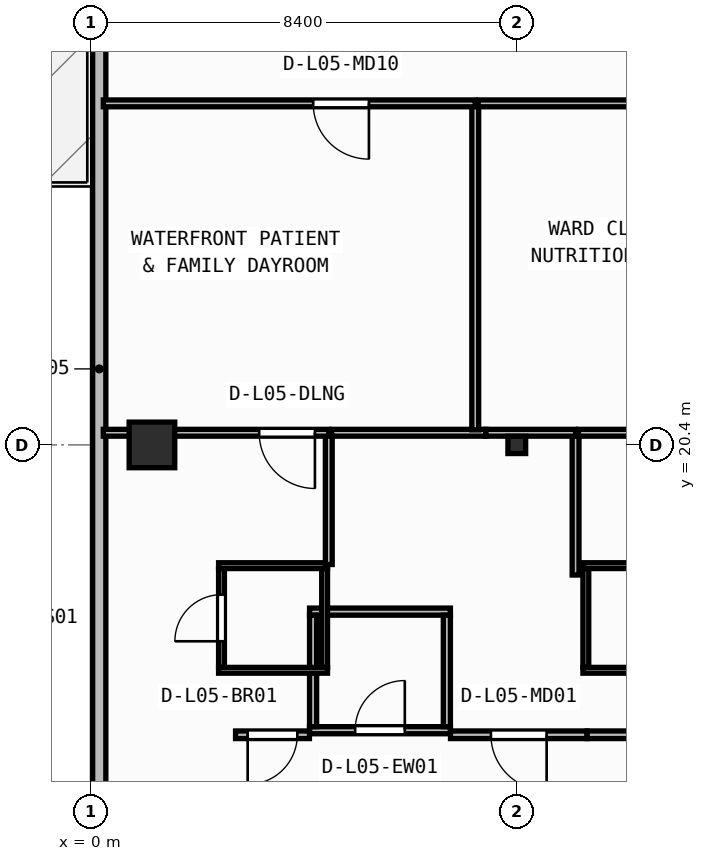
"""IFC4 building model, lengths in metres.
Left out: names, types, materials, properties, quantities, classifications, styles, units other than length and angle.
Written with IfcOpenShell. Run it as: python <this file> out.ifc"""

import sys

from ifc_helpers import new_model, si_unit, direction, frame, frame_2d, origin, origin_2d, place, context, subcontext, project, spatial, rectangle, i_section, extrude, element, fill, save


model = new_model("IFC4")
c1 = context("Model", 3, precision=1e-05, world=origin(), true_north=direction((0.0, 1.0)))
c2 = subcontext(c1, "Body", "Model", "MODEL_VIEW")
j1 = project(units=[si_unit("LENGTHUNIT", "METRE"), si_unit("PLANEANGLEUNIT", "RADIAN")], contexts=[c1])
p1 = place(None, origin())
s1 = spatial("IfcSite", under=j1, at=p1, CompositionType="ELEMENT")
p2 = place(p1, origin())
s2 = spatial("IfcBuilding", under=s1, at=p2, CompositionType="ELEMENT")
p3 = place(p2, frame((0.0, 0.0, 22.5)))
s3 = spatial("IfcBuildingStorey", under=s2, at=p3, CompositionType="ELEMENT", Elevation=22.5)
p4 = place(p3, frame((1.2, 20.4, 0.0), z_axis=(0.0, 0.0, 1.0), x_axis=(1.0, 0.0, 0.0)))
e1 = element("IfcColumn", 1, at=p4, inside=s3, PredefinedType="COLUMN", context=c2, shape_type="SweptSolid", body=[
    extrude(rectangle(XDim=0.9, YDim=0.9, at=origin_2d()), origin(), (0.0, 0.0, 1.0), 3.95),
])
p5 = place(p3, frame((8.4, 20.4, 0.0), z_axis=(0.0, 0.0, 1.0), x_axis=(1.0, 0.0, 0.0)))
e2 = element("IfcColumn", 2, at=p5, inside=s3, PredefinedType="COLUMN", context=c2, shape_type="SweptSolid", body=[
    extrude(i_section(OverallWidth=0.35, OverallDepth=0.34, WebThickness=0.016, FlangeThickness=0.028, at=origin_2d()), origin(), (0.0, 0.0, 1.0), 3.95),
])
p6 = place(p3, frame((0.16, 41.04, 0.0), z_axis=(0.0, 0.0, 1.0), x_axis=(0.0, -1.0, 0.0)))
e3 = element("IfcWall", 3, at=p6, inside=s3, PredefinedType="STANDARD", context=c2, shape_type="SweptSolid", body=[
    extrude(rectangle(XDim=38.28, YDim=0.26, at=frame_2d((19.14, 0.0))), origin(), (0.0, 0.0, 1.0), 3.71),
])
p7 = place(p6, frame((6.793, 0.0, 0.0)))
e4 = element("IfcOpeningElement", 4, at=p7, cuts=e3, PredefinedType="OPENING", context=c2, shape_type="SweptSolid", body=[
    extrude(rectangle(XDim=1.3, YDim=2.15, at=frame_2d((0.65, 1.075))), frame((0.0, 0.14, 0.0), z_axis=(0.0, -1.0, 0.0), x_axis=(1.0, 0.0, 0.0)), (0.0, 0.0, 1.0), 0.28),
])
p8 = place(p3, frame((4.31, 14.77, 0.0), z_axis=(0.0, 0.0, 1.0), x_axis=(1.0, 0.0, 0.0)))
e5 = element("IfcWall", 5, at=p8, inside=s3, PredefinedType="PARTITIONING", context=c2, shape_type="SweptSolid", body=[
    extrude(rectangle(XDim=2.78, YDim=0.14, at=frame_2d((1.39, 0.0))), origin(), (0.0, 0.0, 1.0), 3.71),
])
p9 = place(p8, frame((0.9, 0.0, 0.0)))
e6 = element("IfcOpeningElement", 6, at=p9, cuts=e5, PredefinedType="OPENING", context=c2, shape_type="SweptSolid", body=[
    extrude(rectangle(XDim=0.98, YDim=2.1, at=frame_2d((0.49, 1.05))), frame((0.0, 0.08, 0.0), z_axis=(0.0, -1.0, 0.0), x_axis=(1.0, 0.0, 0.0)), (0.0, 0.0, 1.0), 0.16),
])
p10 = place(p3, frame((4.31, 17.11, 0.0), z_axis=(0.0, 0.0, 1.0), x_axis=(1.0, 0.0, 0.0)))
e7 = element("IfcWall", 7, at=p10, inside=s3, PredefinedType="PARTITIONING", context=c2, shape_type="SweptSolid", body=[
    extrude(rectangle(XDim=2.78, YDim=0.14, at=frame_2d((1.39, 0.0))), origin(), (0.0, 0.0, 1.0), 3.71),
])
for number, where, z_axis, x_axis in (
    (8, (4.38, 14.84, 0.0), (0.0, 0.0, 1.0), (0.0, 1.0, 0.0)),
    (9, (7.02, 14.84, 0.0), (0.0, 0.0, 1.0), (0.0, 1.0, 0.0)),
):
    element("IfcWall", number, at=place(p3, frame(where, z_axis=z_axis, x_axis=x_axis)), inside=s3, PredefinedType="PARTITIONING", context=c2, shape_type="SweptSolid", body=[
        extrude(rectangle(XDim=2.2, YDim=0.14, at=frame_2d((1.1, 0.0))), origin(), (0.0, 0.0, 1.0), 3.71),
    ])
for number, where, z_axis, x_axis in (
    (10, (2.515, 15.952, 0.0), (0.0, 0.0, 1.0), (1.0, 0.0, 0.0)),
    (11, (2.515, 18.018, 0.0), (0.0, 0.0, 1.0), (1.0, 0.0, 0.0)),
):
    element("IfcWall", number, at=place(p3, frame(where, z_axis=z_axis, x_axis=x_axis)), inside=s3, PredefinedType="PARTITIONING", context=c2, shape_type="SweptSolid", body=[
        extrude(rectangle(XDim=2.15, YDim=0.115, at=frame_2d((1.075, 0.0))), origin(), (0.0, 0.0, 1.0), 3.71),
    ])
p11 = place(p3, frame((2.573, 16.01, 0.0), z_axis=(0.0, 0.0, 1.0), x_axis=(0.0, 1.0, 0.0)))
e12 = element("IfcWall", 12, at=p11, inside=s3, PredefinedType="PARTITIONING", context=c2, shape_type="SweptSolid", body=[
    extrude(rectangle(XDim=1.95, YDim=0.115, at=frame_2d((0.975, 0.0))), origin(), (0.0, 0.0, 1.0), 3.71),
])
p12 = place(p11, frame((0.515, 0.0, 0.0)))
e13 = element("IfcOpeningElement", 13, at=p12, cuts=e12, PredefinedType="OPENING", context=c2, shape_type="SweptSolid", body=[
    extrude(rectangle(XDim=0.92, YDim=2.1, at=frame_2d((0.46, 1.05))), frame((0.0, 0.067, 0.0), z_axis=(0.0, -1.0, 0.0), x_axis=(1.0, 0.0, 0.0)), (0.0, 0.0, 1.0), 0.135),
])
p13 = place(p3, frame((4.607, 16.01, 0.0), z_axis=(0.0, 0.0, 1.0), x_axis=(0.0, 1.0, 0.0)))
e14 = element("IfcWall", 14, at=p13, inside=s3, PredefinedType="PARTITIONING", context=c2, shape_type="SweptSolid", body=[
    extrude(rectangle(XDim=1.95, YDim=0.115, at=frame_2d((0.975, 0.0))), origin(), (0.0, 0.0, 1.0), 3.71),
])
for number, where, z_axis, x_axis in (
    (15, (9.705, 15.952, 0.0), (0.0, 0.0, 1.0), (1.0, 0.0, 0.0)),
    (16, (9.705, 18.018, 0.0), (0.0, 0.0, 1.0), (1.0, 0.0, 0.0)),
):
    element("IfcWall", number, at=place(p3, frame(where, z_axis=z_axis, x_axis=x_axis)), inside=s3, PredefinedType="PARTITIONING", context=c2, shape_type="SweptSolid", body=[
        extrude(rectangle(XDim=2.15, YDim=0.115, at=frame_2d((1.075, 0.0))), origin(), (0.0, 0.0, 1.0), 3.71),
    ])
p14 = place(p3, frame((9.762, 16.01, 0.0), z_axis=(0.0, 0.0, 1.0), x_axis=(0.0, 1.0, 0.0)))
e17 = element("IfcWall", 17, at=p14, inside=s3, PredefinedType="PARTITIONING", context=c2, shape_type="SweptSolid", body=[
    extrude(rectangle(XDim=1.95, YDim=0.115, at=frame_2d((0.975, 0.0))), origin(), (0.0, 0.0, 1.0), 3.71),
])
p15 = place(p3, frame((4.308, 14.68, 0.0), z_axis=(0.0, 0.0, 1.0), x_axis=(-1.0, 0.0, 0.0)))
e18 = element("IfcWall", 18, at=p15, inside=s3, PredefinedType="PARTITIONING", context=c2, shape_type="SweptSolid", body=[
    extrude(rectangle(XDim=1.458, YDim=0.15, at=frame_2d((0.729, 0.0))), origin(), (0.0, 0.0, 1.0), 3.71),
])
p16 = place(p15, frame((0.239, 0.0, 0.0)))
e19 = element("IfcOpeningElement", 19, at=p16, cuts=e18, PredefinedType="OPENING", context=c2, shape_type="SweptSolid", body=[
    extrude(rectangle(XDim=0.98, YDim=2.1, at=frame_2d((0.49, 1.05))), frame((0.0, 0.085, 0.0), z_axis=(0.0, -1.0, 0.0), x_axis=(1.0, 0.0, 0.0)), (0.0, 0.0, 1.0), 0.17),
])
p17 = place(p3, frame((9.786, 14.68, 0.0), z_axis=(0.0, 0.0, 1.0), x_axis=(-1.0, 0.0, 0.0)))
e20 = element("IfcWall", 20, at=p17, inside=s3, PredefinedType="PARTITIONING", context=c2, shape_type="SweptSolid", body=[
    extrude(rectangle(XDim=2.694, YDim=0.15, at=frame_2d((1.347, 0.0))), origin(), (0.0, 0.0, 1.0), 3.71),
])
p18 = place(p17, frame((0.797, 0.0, 0.0)))
e21 = element("IfcOpeningElement", 21, at=p18, cuts=e20, PredefinedType="OPENING", context=c2, shape_type="SweptSolid", body=[
    extrude(rectangle(XDim=1.1, YDim=2.1, at=frame_2d((0.55, 1.05))), frame((0.0, 0.085, 0.0), z_axis=(0.0, -1.0, 0.0), x_axis=(1.0, 0.0, 0.0)), (0.0, 0.0, 1.0), 0.17),
])
p19 = place(p3, frame((13.936, 14.68, 0.0), z_axis=(0.0, 0.0, 1.0), x_axis=(-1.0, 0.0, 0.0)))
e22 = element("IfcWall", 22, at=p19, inside=s3, PredefinedType="PARTITIONING", context=c2, shape_type="SweptSolid", body=[
    extrude(rectangle(XDim=4.148, YDim=0.15, at=frame_2d((2.074, 0.0))), origin(), (0.0, 0.0, 1.0), 3.71),
])
p20 = place(p19, frame((1.524, 0.0, 0.0)))
e23 = element("IfcOpeningElement", 23, at=p20, cuts=e22, PredefinedType="OPENING", context=c2, shape_type="SweptSolid", body=[
    extrude(rectangle(XDim=1.1, YDim=2.1, at=frame_2d((0.55, 1.05))), frame((0.0, 0.085, 0.0), z_axis=(0.0, -1.0, 0.0), x_axis=(1.0, 0.0, 0.0)), (0.0, 0.0, 1.0), 0.17),
])
p21 = place(p3, frame((4.69, 18.04, 0.0), z_axis=(0.0, 0.0, 1.0), x_axis=(0.0, 1.0, 0.0)))
e24 = element("IfcWall", 24, at=p21, inside=s3, PredefinedType="PARTITIONING", context=c2, shape_type="SweptSolid", body=[
    extrude(rectangle(XDim=2.6, YDim=0.135, at=frame_2d((1.3, 0.0))), origin(), (0.0, 0.0, 1.0), 3.71),
])
p22 = place(p3, frame((4.69, 20.64, 0.0), z_axis=(0.0, 0.0, 1.0), x_axis=(-1.0, 0.0, 0.0)))
e25 = element("IfcWall", 25, at=p22, inside=s3, PredefinedType="PARTITIONING", context=c2, shape_type="SweptSolid", body=[
    extrude(rectangle(XDim=4.45, YDim=0.135, at=frame_2d((2.225, 0.0))), origin(), (0.0, 0.0, 1.0), 3.073),
])
p23 = place(p22, frame((0.274, 0.0, 0.0)))
e26 = element("IfcOpeningElement", 26, at=p23, cuts=e25, PredefinedType="OPENING", context=c2, shape_type="SweptSolid", body=[
    extrude(rectangle(XDim=1.1, YDim=2.1, at=frame_2d((0.55, 1.05))), frame((0.0, 0.077, 0.0), z_axis=(0.0, -1.0, 0.0), x_axis=(1.0, 0.0, 0.0)), (0.0, 0.0, 1.0), 0.155),
])
p24 = place(p3, frame((9.56, 17.833, 0.0), z_axis=(0.0, 0.0, 1.0), x_axis=(0.0, 1.0, 0.0)))
e27 = element("IfcWall", 27, at=p24, inside=s3, PredefinedType="PARTITIONING", context=c2, shape_type="SweptSolid", body=[
    extrude(rectangle(XDim=2.807, YDim=0.135, at=frame_2d((1.404, 0.0))), origin(), (0.0, 0.0, 1.0), 3.71),
])
p25 = place(p3, frame((7.788, 20.64, 0.0), z_axis=(0.0, 0.0, 1.0), x_axis=(-1.0, 0.0, 0.0)))
e28 = element("IfcWall", 28, at=p25, inside=s3, PredefinedType="PARTITIONING", context=c2, shape_type="SweptSolid", body=[
    extrude(rectangle(XDim=3.04, YDim=0.135, at=frame_2d((1.52, 0.0))), origin(), (0.0, 0.0, 1.0), 3.073),
])
p26 = place(p3, frame((9.56, 20.64, 0.0), z_axis=(0.0, 0.0, 1.0), x_axis=(-1.0, 0.0, 0.0)))
e29 = element("IfcWall", 29, at=p26, inside=s3, PredefinedType="PARTITIONING", context=c2, shape_type="SweptSolid", body=[
    extrude(rectangle(XDim=1.771, YDim=0.135, at=frame_2d((0.885, 0.0))), origin(), (0.0, 0.0, 1.0), 3.073),
])
p27 = place(p3, frame((13.71, 20.64, 0.0), z_axis=(0.0, 0.0, 1.0), x_axis=(-1.0, 0.0, 0.0)))
e30 = element("IfcWall", 30, at=p27, inside=s3, PredefinedType="PARTITIONING", context=c2, shape_type="SweptSolid", body=[
    extrude(rectangle(XDim=4.093, YDim=0.135, at=frame_2d((2.046, 0.0))), origin(), (0.0, 0.0, 1.0), 3.073),
])
p28 = place(p27, frame((0.265, 0.0, 0.0)))
e31 = element("IfcOpeningElement", 31, at=p28, cuts=e30, PredefinedType="OPENING", context=c2, shape_type="SweptSolid", body=[
    extrude(rectangle(XDim=1.1, YDim=2.1, at=frame_2d((0.55, 1.05))), frame((0.0, 0.077, 0.0), z_axis=(0.0, -1.0, 0.0), x_axis=(1.0, 0.0, 0.0)), (0.0, 0.0, 1.0), 0.155),
])
p29 = place(p3, frame((7.58, 20.698, 0.0), z_axis=(0.0, 0.0, 1.0), x_axis=(0.0, 1.0, 0.0)))
e32 = element("IfcWall", 32, at=p29, inside=s3, PredefinedType="PARTITIONING", context=c2, shape_type="SweptSolid", body=[
    extrude(rectangle(XDim=6.442, YDim=0.135, at=frame_2d((3.221, 0.0))), origin(), (0.0, 0.0, 1.0), 3.71),
])
p30 = place(p3, frame((7.58, 27.14, 0.0), z_axis=(0.0, 0.0, 1.0), x_axis=(-1.0, 0.0, 0.0)))
e33 = element("IfcWall", 33, at=p30, inside=s3, PredefinedType="PARTITIONING", context=c2, shape_type="SweptSolid", body=[
    extrude(rectangle(XDim=7.34, YDim=0.135, at=frame_2d((3.67, 0.0))), origin(), (0.0, 0.0, 1.0), 3.71),
])
p31 = place(p30, frame((2.098, 0.0, 0.0)))
e34 = element("IfcOpeningElement", 34, at=p31, cuts=e33, PredefinedType="OPENING", context=c2, shape_type="SweptSolid", body=[
    extrude(rectangle(XDim=1.1, YDim=2.1, at=frame_2d((0.55, 1.05))), frame((0.0, 0.077, 0.0), z_axis=(0.0, -1.0, 0.0), x_axis=(1.0, 0.0, 0.0)), (0.0, 0.0, 1.0), 0.155),
])
p32 = place(p3, frame((16.87, 27.14, 0.0), z_axis=(0.0, 0.0, 1.0), x_axis=(-1.0, 0.0, 0.0)))
e35 = element("IfcWall", 35, at=p32, inside=s3, PredefinedType="PARTITIONING", context=c2, shape_type="SweptSolid", body=[
    extrude(rectangle(XDim=9.233, YDim=0.135, at=frame_2d((4.616, 0.0))), origin(), (0.0, 0.0, 1.0), 3.71),
])
p33 = place(p9, origin())
e36 = element("IfcDoor", 36, at=p33, inside=s3, OperationType="SINGLE_SWING_RIGHT", PredefinedType="DOOR", context=c2, shape_type="SweptSolid", body=[
    extrude(rectangle(XDim=0.98, YDim=2.1, at=frame_2d((0.49, 1.05))), frame((0.0, 0.025, 0.0), z_axis=(0.0, -1.0, 0.0), x_axis=(1.0, 0.0, 0.0)), (0.0, 0.0, 1.0), 0.05),
])
fill(e6, e36)
p34 = place(p12, origin())
e37 = element("IfcDoor", 37, at=p34, inside=s3, OperationType="SINGLE_SWING_LEFT", PredefinedType="DOOR", context=c2, shape_type="SweptSolid", body=[
    extrude(rectangle(XDim=0.92, YDim=2.1, at=frame_2d((0.46, 1.05))), frame((0.0, 0.025, 0.0), z_axis=(0.0, -1.0, 0.0), x_axis=(1.0, 0.0, 0.0)), (0.0, 0.0, 1.0), 0.05),
])
fill(e13, e37)
p35 = place(p16, origin())
e38 = element("IfcDoor", 38, at=p35, inside=s3, OperationType="SINGLE_SWING_RIGHT", PredefinedType="DOOR", context=c2, shape_type="SweptSolid", body=[
    extrude(rectangle(XDim=0.98, YDim=2.1, at=frame_2d((0.49, 1.05))), frame((0.0, 0.025, 0.0), z_axis=(0.0, -1.0, 0.0), x_axis=(1.0, 0.0, 0.0)), (0.0, 0.0, 1.0), 0.05),
])
fill(e19, e38)
p36 = place(p18, origin())
e39 = element("IfcDoor", 39, at=p36, inside=s3, OperationType="SINGLE_SWING_LEFT", PredefinedType="DOOR", context=c2, shape_type="SweptSolid", body=[
    extrude(rectangle(XDim=1.1, YDim=2.1, at=frame_2d((0.55, 1.05))), frame((0.0, 0.025, 0.0), z_axis=(0.0, -1.0, 0.0), x_axis=(1.0, 0.0, 0.0)), (0.0, 0.0, 1.0), 0.05),
])
fill(e21, e39)
p37 = place(p23, origin())
e40 = element("IfcDoor", 40, at=p37, inside=s3, OperationType="SINGLE_SWING_LEFT", PredefinedType="DOOR", context=c2, shape_type="SweptSolid", body=[
    extrude(rectangle(XDim=1.1, YDim=2.1, at=frame_2d((0.55, 1.05))), frame((0.0, 0.025, 0.0), z_axis=(0.0, -1.0, 0.0), x_axis=(1.0, 0.0, 0.0)), (0.0, 0.0, 1.0), 0.05),
])
fill(e26, e40)
p38 = place(p31, origin())
e41 = element("IfcDoor", 41, at=p38, inside=s3, OperationType="SINGLE_SWING_LEFT", PredefinedType="DOOR", context=c2, shape_type="SweptSolid", body=[
    extrude(rectangle(XDim=1.1, YDim=2.1, at=frame_2d((0.55, 1.05))), frame((0.0, 0.025, 0.0), z_axis=(0.0, -1.0, 0.0), x_axis=(1.0, 0.0, 0.0)), (0.0, 0.0, 1.0), 0.05),
])
fill(e34, e41)
save(model, sys.argv[1])
